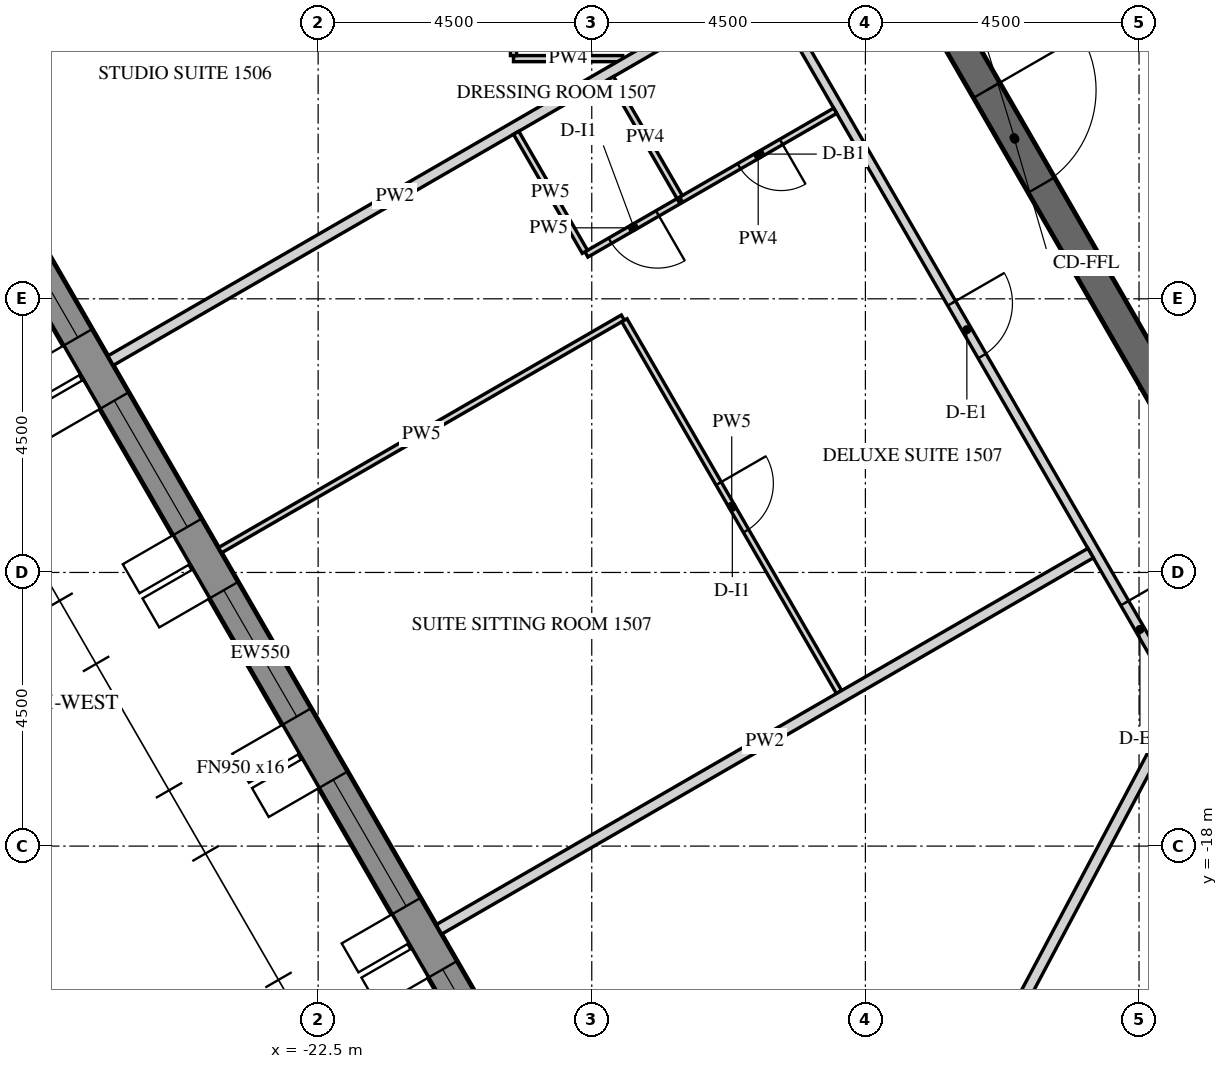
"""IFC4 building model, lengths in metres.
Left out: names, types, materials, properties, quantities, classifications, styles, units other than length and angle.
Written with IfcOpenShell. Run it as: python <this file> out.ifc"""

import sys

from ifc_helpers import new_model, si_unit, direction, frame, frame_2d, origin, place, context, subcontext, project, spatial, polyline, rectangle, outline, extrude, element, fill, save


model = new_model("IFC4")
c1 = context("Model", 3, precision=1e-05, world=origin(), true_north=direction((0.0, 1.0)))
c2 = subcontext(c1, "Body", "Model", "MODEL_VIEW")
j1 = project(units=[si_unit("LENGTHUNIT", "METRE"), si_unit("PLANEANGLEUNIT", "RADIAN")], contexts=[c1])
p1 = place(None, origin())
s1 = spatial("IfcSite", under=j1, at=p1, CompositionType="ELEMENT")
p2 = place(p1, origin())
s2 = spatial("IfcBuilding", under=s1, at=p2, CompositionType="ELEMENT")
p3 = place(p2, frame((0.0, 0.0, 195.6)))
s3 = spatial("IfcBuildingStorey", under=s2, at=p3, CompositionType="ELEMENT", Elevation=195.6)
p4 = place(p3, frame((-30.391, -2.811, -0.15), z_axis=(0.0, 0.0, 1.0), x_axis=(0.499998569178, -0.866026229868, 0.0)))
e1 = element("IfcWall", 1, at=p4, inside=s3, PredefinedType="SOLIDWALL", context=c2, shape_type="SweptSolid", body=[
    extrude(outline(polyline([(-0.022, -0.275), (27.783, -0.275), (27.732, 0.275), (0.022, 0.275), (-0.022, -0.275)])), origin(), (0.0, 0.0, 1.0), 3.9),
])
p5 = place(p4, frame((1.879, 0.0, 1.05)))
e2 = element("IfcOpeningElement", 2, at=p5, cuts=e1, PredefinedType="OPENING", context=c2, shape_type="SweptSolid", body=[
    extrude(rectangle(XDim=2.4, YDim=2.4, at=frame_2d((1.2, 1.2))), frame((0.0, 0.285, 0.0), z_axis=(0.0, -1.0, 0.0), x_axis=(1.0, 0.0, 0.0)), (0.0, 0.0, 1.0), 0.57),
])
p6 = place(p4, frame((5.479, 0.0, 1.05)))
e3 = element("IfcOpeningElement", 3, at=p6, cuts=e1, PredefinedType="OPENING", context=c2, shape_type="SweptSolid", body=[
    extrude(rectangle(XDim=2.4, YDim=2.4, at=frame_2d((1.2, 1.2))), frame((0.0, 0.285, 0.0), z_axis=(0.0, -1.0, 0.0), x_axis=(1.0, 0.0, 0.0)), (0.0, 0.0, 1.0), 0.57),
])
p7 = place(p4, frame((9.079, 0.0, 1.05)))
e4 = element("IfcOpeningElement", 4, at=p7, cuts=e1, PredefinedType="OPENING", context=c2, shape_type="SweptSolid", body=[
    extrude(rectangle(XDim=2.4, YDim=2.4, at=frame_2d((1.2, 1.2))), frame((0.0, 0.285, 0.0), z_axis=(0.0, -1.0, 0.0), x_axis=(1.0, 0.0, 0.0)), (0.0, 0.0, 1.0), 0.57),
])
p8 = place(p4, frame((12.679, 0.0, 1.05)))
e5 = element("IfcOpeningElement", 5, at=p8, cuts=e1, PredefinedType="OPENING", context=c2, shape_type="SweptSolid", body=[
    extrude(rectangle(XDim=2.4, YDim=2.4, at=frame_2d((1.2, 1.2))), frame((0.0, 0.285, 0.0), z_axis=(0.0, -1.0, 0.0), x_axis=(1.0, 0.0, 0.0)), (0.0, 0.0, 1.0), 0.57),
])
p9 = place(p4, frame((16.279, 0.0, 1.05)))
e6 = element("IfcOpeningElement", 6, at=p9, cuts=e1, PredefinedType="OPENING", context=c2, shape_type="SweptSolid", body=[
    extrude(rectangle(XDim=2.4, YDim=2.4, at=frame_2d((1.2, 1.2))), frame((0.0, 0.285, 0.0), z_axis=(0.0, -1.0, 0.0), x_axis=(1.0, 0.0, 0.0)), (0.0, 0.0, 1.0), 0.57),
])
p10 = place(p4, frame((19.879, 0.0, 1.05)))
e7 = element("IfcOpeningElement", 7, at=p10, cuts=e1, PredefinedType="OPENING", context=c2, shape_type="SweptSolid", body=[
    extrude(rectangle(XDim=2.4, YDim=2.4, at=frame_2d((1.2, 1.2))), frame((0.0, 0.285, 0.0), z_axis=(0.0, -1.0, 0.0), x_axis=(1.0, 0.0, 0.0)), (0.0, 0.0, 1.0), 0.57),
])
p11 = place(p4, frame((23.479, 0.0, 1.05)))
e8 = element("IfcOpeningElement", 8, at=p11, cuts=e1, PredefinedType="OPENING", context=c2, shape_type="SweptSolid", body=[
    extrude(rectangle(XDim=2.4, YDim=2.4, at=frame_2d((1.2, 1.2))), frame((0.0, 0.285, 0.0), z_axis=(0.0, -1.0, 0.0), x_axis=(1.0, 0.0, 0.0)), (0.0, 0.0, 1.0), 0.57),
])
p12 = place(p3, frame((-14.722, 0.0, -0.15), z_axis=(0.0, 0.0, 1.0), x_axis=(0.50000571537, -0.866022103989, 0.0)))
e9 = element("IfcWall", 9, at=p12, inside=s3, PredefinedType="SHEAR", context=c2, shape_type="SweptSolid", body=[
    extrude(outline(polyline([(-0.144, -0.25), (14.867, -0.25), (14.578, 0.25), (0.144, 0.25), (-0.144, -0.25)])), origin(), (0.0, 0.0, 1.0), 3.9),
])
p13 = place(p12, frame((6.432, 0.0, 0.15)))
e10 = element("IfcOpeningElement", 10, at=p13, cuts=e9, PredefinedType="OPENING", context=c2, shape_type="SweptSolid", body=[
    extrude(rectangle(XDim=1.8, YDim=2.4, at=frame_2d((0.9, 1.2))), frame((0.0, 0.26, 0.0), z_axis=(0.0, -1.0, 0.0), x_axis=(1.0, 0.0, 0.0)), (0.0, 0.0, 1.0), 0.52),
])
p14 = place(p3, frame((-11.345, 0.0, -0.15), z_axis=(0.0, 0.0, 1.0), x_axis=(0.499995046907, -0.866028263435, 0.0)))
e11 = element("IfcWall", 11, at=p14, inside=s3, PredefinedType="SHEAR", context=c2, shape_type="SweptSolid", body=[
    extrude(outline(polyline([(-0.101, -0.175), (11.446, -0.175), (11.244, 0.175), (0.101, 0.175), (-0.101, -0.175)])), origin(), (0.0, 0.0, 1.0), 3.9),
])
p15 = place(p14, frame((4.744, 0.0, 0.15)))
e12 = element("IfcOpeningElement", 12, at=p15, cuts=e11, PredefinedType="OPENING", context=c2, shape_type="SweptSolid", body=[
    extrude(rectangle(XDim=1.8, YDim=2.4, at=frame_2d((0.9, 1.2))), frame((0.0, 0.185, 0.0), z_axis=(0.0, -1.0, 0.0), x_axis=(1.0, 0.0, 0.0)), (0.0, 0.0, 1.0), 0.37),
])
p16 = place(p3, frame((-15.094, -3.856, 0.0), z_axis=(0.0, 0.0, 1.0), x_axis=(0.500006037985, -0.866021917724, 0.0)))
e13 = element("IfcWall", 13, at=p16, inside=s3, PredefinedType="PARTITIONING", context=c2, shape_type="SweptSolid", body=[
    extrude(rectangle(XDim=12.867, YDim=0.15, at=frame_2d((6.434, 0.0))), origin(), (0.0, 0.0, 1.0), 2.988),
])
p17 = place(p16, frame((6.025, 0.0, 0.0)))
e14 = element("IfcOpeningElement", 14, at=p17, cuts=e13, PredefinedType="OPENING", context=c2, shape_type="SweptSolid", body=[
    extrude(rectangle(XDim=1.0, YDim=2.1, at=frame_2d((0.5, 1.05))), frame((0.0, 0.085, 0.0), z_axis=(0.0, -1.0, 0.0), x_axis=(1.0, 0.0, 0.0)), (0.0, 0.0, 1.0), 0.17),
])
p18 = place(p16, frame((11.717, 0.0, 0.0)))
e15 = element("IfcOpeningElement", 15, at=p18, cuts=e13, PredefinedType="OPENING", context=c2, shape_type="SweptSolid", body=[
    extrude(rectangle(XDim=1.0, YDim=2.1, at=frame_2d((0.5, 1.05))), frame((0.0, 0.085, 0.0), z_axis=(0.0, -1.0, 0.0), x_axis=(1.0, 0.0, 0.0)), (0.0, 0.0, 1.0), 0.17),
])
p19 = place(p3, frame((-17.491, -5.05, 0.0), z_axis=(0.0, 0.0, 1.0), x_axis=(-1.0, 0.0, 0.0)))
e16 = element("IfcWall", 16, at=p19, inside=s3, PredefinedType="PARTITIONING", context=c2, shape_type="SweptSolid", body=[
    extrude(rectangle(XDim=1.796, YDim=0.1, at=frame_2d((0.898, 0.0))), origin(), (0.0, 0.0, 1.0), 2.988),
])
p20 = place(p3, frame((-19.287, -5.0, 0.0), z_axis=(0.0, 0.0, 1.0), x_axis=(0.0, 1.0, 0.0)))
e17 = element("IfcWall", 17, at=p20, inside=s3, PredefinedType="PARTITIONING", context=c2, shape_type="SweptSolid", body=[
    extrude(rectangle(XDim=2.875, YDim=0.1, at=frame_2d((1.438, 0.0))), origin(), (0.0, 0.0, 1.0), 2.988),
])
p21 = place(p20, frame((1.05, 0.0, 0.0)))
e18 = element("IfcOpeningElement", 18, at=p21, cuts=e17, PredefinedType="OPENING", context=c2, shape_type="SweptSolid", body=[
    extrude(rectangle(XDim=0.8, YDim=2.1, at=frame_2d((0.4, 1.05))), frame((0.0, 0.06, 0.0), z_axis=(0.0, -1.0, 0.0), x_axis=(1.0, 0.0, 0.0)), (0.0, 0.0, 1.0), 0.12),
])
p22 = place(p3, frame((-25.914, -10.017, 0.0), z_axis=(0.0, 0.0, 1.0), x_axis=(0.866019956843, 0.50000943426, 0.0)))
e19 = element("IfcWall", 19, at=p22, inside=s3, PredefinedType="PARTITIONING", context=c2, shape_type="SweptSolid", body=[
    extrude(rectangle(XDim=10.801, YDim=0.18, at=frame_2d((5.4, 0.0))), origin(), (0.0, 0.0, 1.0), 2.988),
])
p23 = place(p3, frame((-13.996, -5.907, 0.0), z_axis=(0.0, 0.0, 1.0), x_axis=(-0.86601045545, -0.500025890382, 0.0)))
e20 = element("IfcWall", 20, at=p23, inside=s3, PredefinedType="PARTITIONING", context=c2, shape_type="SweptSolid", body=[
    extrude(rectangle(XDim=2.925, YDim=0.1, at=frame_2d((1.462, 0.0))), origin(), (0.0, 0.0, 1.0), 2.988),
])
p24 = place(p23, frame((1.025, 0.0, 0.0)))
e21 = element("IfcOpeningElement", 21, at=p24, cuts=e20, PredefinedType="OPENING", context=c2, shape_type="SweptSolid", body=[
    extrude(rectangle(XDim=0.8, YDim=2.1, at=frame_2d((0.4, 1.05))), frame((0.0, 0.06, 0.0), z_axis=(0.0, -1.0, 0.0), x_axis=(1.0, 0.0, 0.0)), (0.0, 0.0, 1.0), 0.12),
])
p25 = place(p3, frame((-16.573, -7.395, 0.0), z_axis=(0.0, 0.0, 1.0), x_axis=(-0.866036909293, -0.499980071345, 0.0)))
e22 = element("IfcWall", 22, at=p25, inside=s3, PredefinedType="PARTITIONING", context=c2, shape_type="SweptSolid", body=[
    extrude(rectangle(XDim=1.75, YDim=0.1, at=frame_2d((0.875, 0.0))), origin(), (0.0, 0.0, 1.0), 2.988),
])
p26 = place(p25, frame((0.4, 0.0, 0.0)))
e23 = element("IfcOpeningElement", 23, at=p26, cuts=e22, PredefinedType="OPENING", context=c2, shape_type="SweptSolid", body=[
    extrude(rectangle(XDim=0.9, YDim=2.1, at=frame_2d((0.45, 1.05))), frame((0.0, 0.06, 0.0), z_axis=(0.0, -1.0, 0.0), x_axis=(1.0, 0.0, 0.0)), (0.0, 0.0, 1.0), 0.12),
])
p27 = place(p3, frame((-18.113, -8.227, 0.0), z_axis=(0.0, 0.0, 1.0), x_axis=(-0.500031020067, 0.8660074936, 0.0)))
e24 = element("IfcWall", 24, at=p27, inside=s3, PredefinedType="PARTITIONING", context=c2, shape_type="SweptSolid", body=[
    extrude(rectangle(XDim=2.26, YDim=0.1, at=frame_2d((1.13, 0.0))), origin(), (0.0, 0.0, 1.0), 2.988),
])
p28 = place(p3, frame((-24.114, -13.134, 0.0), z_axis=(0.0, 0.0, 1.0), x_axis=(0.866033062874, 0.499986733834, 0.0)))
e25 = element("IfcWall", 25, at=p28, inside=s3, PredefinedType="PARTITIONING", context=c2, shape_type="SweptSolid", body=[
    extrude(rectangle(XDim=7.65, YDim=0.1, at=frame_2d((3.825, 0.0))), origin(), (0.0, 0.0, 1.0), 2.988),
])
p29 = place(p3, frame((-17.463, -9.353, 0.0), z_axis=(0.0, 0.0, 1.0), x_axis=(0.499995846692, -0.866027801685, 0.0)))
e26 = element("IfcWall", 26, at=p29, inside=s3, PredefinedType="PARTITIONING", context=c2, shape_type="SweptSolid", body=[
    extrude(rectangle(XDim=7.06, YDim=0.1, at=frame_2d((3.53, 0.0))), origin(), (0.0, 0.0, 1.0), 2.988),
])
p30 = place(p29, frame((3.1, 0.0, 0.0)))
e27 = element("IfcOpeningElement", 27, at=p30, cuts=e26, PredefinedType="OPENING", context=c2, shape_type="SweptSolid", body=[
    extrude(rectangle(XDim=0.9, YDim=2.1, at=frame_2d((0.45, 1.05))), frame((0.0, 0.06, 0.0), z_axis=(0.0, -1.0, 0.0), x_axis=(1.0, 0.0, 0.0)), (0.0, 0.0, 1.0), 0.12),
])
p31 = place(p3, frame((-20.513, -19.37, 0.0), z_axis=(0.0, 0.0, 1.0), x_axis=(0.866024931941, 0.500000817256, 0.0)))
e28 = element("IfcWall", 28, at=p31, inside=s3, PredefinedType="PARTITIONING", context=c2, shape_type="SweptSolid", body=[
    extrude(rectangle(XDim=12.375, YDim=0.18, at=frame_2d((6.188, 0.0))), origin(), (0.0, 0.0, 1.0), 2.988),
])
p32 = place(p3, frame((-17.685, -5.37, 0.0), z_axis=(0.0, 0.0, 1.0), x_axis=(0.500077800282, -0.865980481111, 0.0)))
e29 = element("IfcWall", 29, at=p32, inside=s3, PredefinedType="PARTITIONING", context=c2, shape_type="SweptSolid", body=[
    extrude(rectangle(XDim=2.26, YDim=0.1, at=frame_2d((1.13, 0.0))), origin(), (0.0, 0.0, 1.0), 2.988),
])
p33 = place(p3, frame((-14.876, -27.977, 0.0), z_axis=(0.0, 0.0, 1.0), x_axis=(0.469468328163, 0.882949312731, 0.0)))
e30 = element("IfcWall", 30, at=p33, inside=s3, PredefinedType="PARTITIONING", context=c2, shape_type="SweptSolid", body=[
    extrude(rectangle(XDim=14.613, YDim=0.18, at=frame_2d((7.306, 0.0))), origin(), (0.0, 0.0, 1.0), 2.988),
])
p34 = place(p6, frame((0.0, 0.205, 0.0)))
e31 = element("IfcWindow", 31, at=p34, inside=s3, PartitioningType="DOUBLE_PANEL_VERTICAL", PredefinedType="WINDOW", context=c2, shape_type="SweptSolid", body=[
    extrude(rectangle(XDim=2.4, YDim=2.4, at=frame_2d((1.2, 1.2))), frame((0.0, 0.03, 0.0), z_axis=(0.0, -1.0, 0.0), x_axis=(1.0, 0.0, 0.0)), (0.0, 0.0, 1.0), 0.06),
])
fill(e3, e31)
p35 = place(p7, frame((0.0, 0.205, 0.0)))
e32 = element("IfcWindow", 32, at=p35, inside=s3, PartitioningType="DOUBLE_PANEL_VERTICAL", PredefinedType="WINDOW", context=c2, shape_type="SweptSolid", body=[
    extrude(rectangle(XDim=2.4, YDim=2.4, at=frame_2d((1.2, 1.2))), frame((0.0, 0.03, 0.0), z_axis=(0.0, -1.0, 0.0), x_axis=(1.0, 0.0, 0.0)), (0.0, 0.0, 1.0), 0.06),
])
fill(e4, e32)
p36 = place(p8, frame((0.0, 0.205, 0.0)))
e33 = element("IfcWindow", 33, at=p36, inside=s3, PartitioningType="DOUBLE_PANEL_VERTICAL", PredefinedType="WINDOW", context=c2, shape_type="SweptSolid", body=[
    extrude(rectangle(XDim=2.4, YDim=2.4, at=frame_2d((1.2, 1.2))), frame((0.0, 0.03, 0.0), z_axis=(0.0, -1.0, 0.0), x_axis=(1.0, 0.0, 0.0)), (0.0, 0.0, 1.0), 0.06),
])
fill(e5, e33)
p37 = place(p9, frame((0.0, 0.205, 0.0)))
e34 = element("IfcWindow", 34, at=p37, inside=s3, PartitioningType="DOUBLE_PANEL_VERTICAL", PredefinedType="WINDOW", context=c2, shape_type="SweptSolid", body=[
    extrude(rectangle(XDim=2.4, YDim=2.4, at=frame_2d((1.2, 1.2))), frame((0.0, 0.03, 0.0), z_axis=(0.0, -1.0, 0.0), x_axis=(1.0, 0.0, 0.0)), (0.0, 0.0, 1.0), 0.06),
])
fill(e6, e34)
p38 = place(p10, frame((0.0, 0.205, 0.0)))
e35 = element("IfcWindow", 35, at=p38, inside=s3, PartitioningType="DOUBLE_PANEL_VERTICAL", PredefinedType="WINDOW", context=c2, shape_type="SweptSolid", body=[
    extrude(rectangle(XDim=2.4, YDim=2.4, at=frame_2d((1.2, 1.2))), frame((0.0, 0.03, 0.0), z_axis=(0.0, -1.0, 0.0), x_axis=(1.0, 0.0, 0.0)), (0.0, 0.0, 1.0), 0.06),
])
fill(e7, e35)
p39 = place(p13, origin())
e36 = element("IfcDoor", 36, at=p39, inside=s3, OperationType="DOUBLE_DOOR_SINGLE_SWING", PredefinedType="DOOR", context=c2, shape_type="SweptSolid", body=[
    extrude(rectangle(XDim=1.8, YDim=2.4, at=frame_2d((0.9, 1.2))), frame((0.0, 0.025, 0.0), z_axis=(0.0, -1.0, 0.0), x_axis=(1.0, 0.0, 0.0)), (0.0, 0.0, 1.0), 0.05),
])
fill(e10, e36)
p40 = place(p15, origin())
e37 = element("IfcDoor", 37, at=p40, inside=s3, OperationType="DOUBLE_DOOR_SINGLE_SWING", PredefinedType="DOOR", context=c2, shape_type="SweptSolid", body=[
    extrude(rectangle(XDim=1.8, YDim=2.4, at=frame_2d((0.9, 1.2))), frame((0.0, 0.025, 0.0), z_axis=(0.0, -1.0, 0.0), x_axis=(1.0, 0.0, 0.0)), (0.0, 0.0, 1.0), 0.05),
])
fill(e12, e37)
p41 = place(p17, origin())
e38 = element("IfcDoor", 38, at=p41, inside=s3, OperationType="SINGLE_SWING_LEFT", PredefinedType="DOOR", context=c2, shape_type="SweptSolid", body=[
    extrude(rectangle(XDim=1.0, YDim=2.1, at=frame_2d((0.5, 1.05))), frame((0.0, 0.025, 0.0), z_axis=(0.0, -1.0, 0.0), x_axis=(1.0, 0.0, 0.0)), (0.0, 0.0, 1.0), 0.05),
])
fill(e14, e38)
p42 = place(p24, origin())
e39 = element("IfcDoor", 39, at=p42, inside=s3, OperationType="SINGLE_SWING_RIGHT", PredefinedType="DOOR", context=c2, shape_type="SweptSolid", body=[
    extrude(rectangle(XDim=0.8, YDim=2.1, at=frame_2d((0.4, 1.05))), frame((0.0, 0.025, 0.0), z_axis=(0.0, -1.0, 0.0), x_axis=(1.0, 0.0, 0.0)), (0.0, 0.0, 1.0), 0.05),
])
fill(e21, e39)
p43 = place(p26, origin())
e40 = element("IfcDoor", 40, at=p43, inside=s3, OperationType="SINGLE_SWING_RIGHT", PredefinedType="DOOR", context=c2, shape_type="SweptSolid", body=[
    extrude(rectangle(XDim=0.9, YDim=2.1, at=frame_2d((0.45, 1.05))), frame((0.0, 0.025, 0.0), z_axis=(0.0, -1.0, 0.0), x_axis=(1.0, 0.0, 0.0)), (0.0, 0.0, 1.0), 0.05),
])
fill(e23, e40)
p44 = place(p30, origin())
e41 = element("IfcDoor", 41, at=p44, inside=s3, OperationType="SINGLE_SWING_RIGHT", PredefinedType="DOOR", context=c2, shape_type="SweptSolid", body=[
    extrude(rectangle(XDim=0.9, YDim=2.1, at=frame_2d((0.45, 1.05))), frame((0.0, 0.025, 0.0), z_axis=(0.0, -1.0, 0.0), x_axis=(1.0, 0.0, 0.0)), (0.0, 0.0, 1.0), 0.05),
])
fill(e27, e41)
p45 = place(p18, origin())
e42 = element("IfcDoor", 42, at=p45, inside=s3, OperationType="SINGLE_SWING_LEFT", PredefinedType="DOOR", context=c2, shape_type="SweptSolid", body=[
    extrude(rectangle(XDim=1.0, YDim=2.1, at=frame_2d((0.5, 1.05))), frame((0.0, 0.025, 0.0), z_axis=(0.0, -1.0, 0.0), x_axis=(1.0, 0.0, 0.0)), (0.0, 0.0, 1.0), 0.05),
])
fill(e15, e42)
save(model, sys.argv[1])
